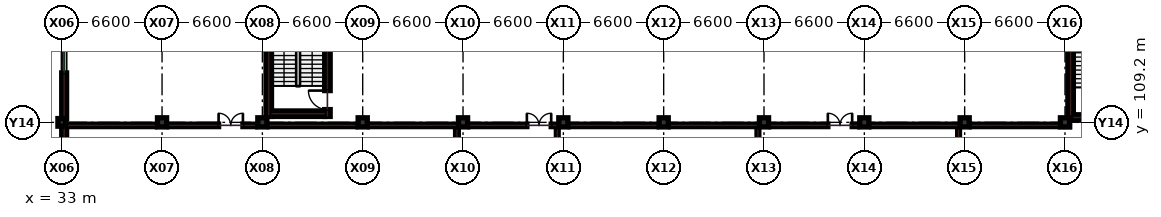
"""IFC4 building model, lengths in metres.
Left out: names, types, materials, properties, quantities, classifications, styles, units other than length and angle.
Written with IfcOpenShell. Run it as: python <this file> out.ifc"""

import sys

from ifc_helpers import new_model, si_unit, direction, frame, frame_2d, origin, origin_2d, place, context, subcontext, project, spatial, rectangle, extrude, element, fill, save


model = new_model("IFC4")
c1 = context("Model", 3, precision=1e-05, world=origin(), true_north=direction((0.0, 1.0)))
c2 = subcontext(c1, "Body", "Model", "MODEL_VIEW")
j1 = project(units=[si_unit("LENGTHUNIT", "METRE"), si_unit("PLANEANGLEUNIT", "RADIAN")], contexts=[c1])
p1 = place(None, origin())
s1 = spatial("IfcSite", under=j1, at=p1, CompositionType="ELEMENT")
p2 = place(p1, origin())
s2 = spatial("IfcBuilding", under=s1, at=p2, CompositionType="ELEMENT")
p3 = place(p2, frame((0.0, 0.0, 9.9)))
s3 = spatial("IfcBuildingStorey", under=s2, at=p3, CompositionType="ELEMENT", Elevation=9.9)
p4 = place(p3, frame((33.0, 109.2, 0.0), z_axis=(0.0, 0.0, 1.0), x_axis=(1.0, 0.0, 0.0)))
e1 = element("IfcColumn", 1, at=p4, inside=s3, PredefinedType="COLUMN", context=c2, shape_type="SweptSolid", body=[
    extrude(rectangle(XDim=0.5, YDim=0.5, at=origin_2d()), origin(), (0.0, 0.0, 1.0), 4.5),
])
for number, where, z_axis, x_axis in (
    (2, (39.6, 109.2, 0.0), (0.0, 0.0, 1.0), (1.0, 0.0, 0.0)),
    (3, (46.2, 109.2, 0.0), (0.0, 0.0, 1.0), (1.0, 0.0, 0.0)),
    (4, (52.8, 109.2, 0.0), (0.0, 0.0, 1.0), (1.0, 0.0, 0.0)),
    (5, (59.4, 109.2, 0.0), (0.0, 0.0, 1.0), (1.0, 0.0, 0.0)),
    (6, (66.0, 109.2, 0.0), (0.0, 0.0, 1.0), (1.0, 0.0, 0.0)),
    (7, (72.6, 109.2, 0.0), (0.0, 0.0, 1.0), (1.0, 0.0, 0.0)),
    (8, (79.2, 109.2, 0.0), (0.0, 0.0, 1.0), (1.0, 0.0, 0.0)),
    (9, (85.8, 109.2, 0.0), (0.0, 0.0, 1.0), (1.0, 0.0, 0.0)),
    (10, (92.4, 109.2, 0.0), (0.0, 0.0, 1.0), (1.0, 0.0, 0.0)),
    (11, (99.0, 109.2, 0.0), (0.0, 0.0, 1.0), (1.0, 0.0, 0.0)),
):
    element("IfcColumn", number, at=place(p3, frame(where, z_axis=z_axis, x_axis=x_axis)), inside=s3, PredefinedType="COLUMN", context=c2, shape_type="SweptSolid", body=[
        extrude(rectangle(XDim=0.6, YDim=0.6, at=origin_2d()), origin(), (0.0, 0.0, 1.0), 4.5),
    ])
p5 = place(p3, frame((33.32, 109.0, 0.0), z_axis=(0.0, 0.0, 1.0), x_axis=(1.0, 0.0, 0.0)))
e12 = element("IfcWall", 12, at=p5, inside=s3, PredefinedType="PARTITIONING", context=c2, shape_type="SweptSolid", body=[
    extrude(rectangle(XDim=5.83, YDim=0.16, at=frame_2d((2.915, 0.0))), origin(), (0.0, 0.0, 1.0), 3.475),
])
p6 = place(p3, frame((40.05, 109.0, 0.0), z_axis=(0.0, 0.0, 1.0), x_axis=(1.0, 0.0, 0.0)))
e13 = element("IfcWall", 13, at=p6, inside=s3, PredefinedType="PARTITIONING", context=c2, shape_type="SweptSolid", body=[
    extrude(rectangle(XDim=5.7, YDim=0.16, at=frame_2d((2.85, 0.0))), origin(), (0.0, 0.0, 1.0), 3.475),
])
p7 = place(p6, frame((3.27, 0.0, 0.0)))
e14 = element("IfcOpeningElement", 14, at=p7, cuts=e13, PredefinedType="OPENING", context=c2, shape_type="SweptSolid", body=[
    extrude(rectangle(XDim=1.6, YDim=2.2, at=frame_2d((0.8, 1.1))), frame((0.0, 0.09, 0.0), z_axis=(0.0, -1.0, 0.0), x_axis=(1.0, 0.0, 0.0)), (0.0, 0.0, 1.0), 0.18),
])
p8 = place(p3, frame((46.65, 109.0, 0.0), z_axis=(0.0, 0.0, 1.0), x_axis=(1.0, 0.0, 0.0)))
e15 = element("IfcWall", 15, at=p8, inside=s3, PredefinedType="PARTITIONING", context=c2, shape_type="SweptSolid", body=[
    extrude(rectangle(XDim=5.7, YDim=0.16, at=frame_2d((2.85, 0.0))), origin(), (0.0, 0.0, 1.0), 3.475),
])
p9 = place(p3, frame((53.25, 109.0, 0.0), z_axis=(0.0, 0.0, 1.0), x_axis=(1.0, 0.0, 0.0)))
e16 = element("IfcWall", 16, at=p9, inside=s3, PredefinedType="PARTITIONING", context=c2, shape_type="SweptSolid", body=[
    extrude(rectangle(XDim=5.7, YDim=0.16, at=frame_2d((2.85, 0.0))), origin(), (0.0, 0.0, 1.0), 3.475),
])
p10 = place(p3, frame((59.85, 109.0, 0.0), z_axis=(0.0, 0.0, 1.0), x_axis=(1.0, 0.0, 0.0)))
e17 = element("IfcWall", 17, at=p10, inside=s3, PredefinedType="PARTITIONING", context=c2, shape_type="SweptSolid", body=[
    extrude(rectangle(XDim=5.7, YDim=0.16, at=frame_2d((2.85, 0.0))), origin(), (0.0, 0.0, 1.0), 3.475),
])
p11 = place(p10, frame((3.75, 0.0, 0.0)))
e18 = element("IfcOpeningElement", 18, at=p11, cuts=e17, PredefinedType="OPENING", context=c2, shape_type="SweptSolid", body=[
    extrude(rectangle(XDim=1.6, YDim=2.2, at=frame_2d((0.8, 1.1))), frame((0.0, 0.09, 0.0), z_axis=(0.0, -1.0, 0.0), x_axis=(1.0, 0.0, 0.0)), (0.0, 0.0, 1.0), 0.18),
])
for number, where, z_axis, x_axis in (
    (19, (66.45, 109.0, 0.0), (0.0, 0.0, 1.0), (1.0, 0.0, 0.0)),
    (20, (73.05, 109.0, 0.0), (0.0, 0.0, 1.0), (1.0, 0.0, 0.0)),
):
    element("IfcWall", number, at=place(p3, frame(where, z_axis=z_axis, x_axis=x_axis)), inside=s3, PredefinedType="PARTITIONING", context=c2, shape_type="SweptSolid", body=[
        extrude(rectangle(XDim=5.7, YDim=0.16, at=frame_2d((2.85, 0.0))), origin(), (0.0, 0.0, 1.0), 3.475),
    ])
p12 = place(p3, frame((79.65, 109.0, 0.0), z_axis=(0.0, 0.0, 1.0), x_axis=(1.0, 0.0, 0.0)))
e21 = element("IfcWall", 21, at=p12, inside=s3, PredefinedType="PARTITIONING", context=c2, shape_type="SweptSolid", body=[
    extrude(rectangle(XDim=5.7, YDim=0.16, at=frame_2d((2.85, 0.0))), origin(), (0.0, 0.0, 1.0), 3.475),
])
p13 = place(p12, frame((3.75, 0.0, 0.0)))
e22 = element("IfcOpeningElement", 22, at=p13, cuts=e21, PredefinedType="OPENING", context=c2, shape_type="SweptSolid", body=[
    extrude(rectangle(XDim=1.6, YDim=2.2, at=frame_2d((0.8, 1.1))), frame((0.0, 0.09, 0.0), z_axis=(0.0, -1.0, 0.0), x_axis=(1.0, 0.0, 0.0)), (0.0, 0.0, 1.0), 0.18),
])
p14 = place(p3, frame((86.25, 109.0, 0.0), z_axis=(0.0, 0.0, 1.0), x_axis=(1.0, 0.0, 0.0)))
e23 = element("IfcWall", 23, at=p14, inside=s3, PredefinedType="PARTITIONING", context=c2, shape_type="SweptSolid", body=[
    extrude(rectangle(XDim=5.7, YDim=0.16, at=frame_2d((2.85, 0.0))), origin(), (0.0, 0.0, 1.0), 3.475),
])
p15 = place(p3, frame((92.85, 109.0, 0.0), z_axis=(0.0, 0.0, 1.0), x_axis=(1.0, 0.0, 0.0)))
e24 = element("IfcWall", 24, at=p15, inside=s3, PredefinedType="PARTITIONING", context=c2, shape_type="SweptSolid", body=[
    extrude(rectangle(XDim=6.45, YDim=0.16, at=frame_2d((3.225, 0.0))), origin(), (0.0, 0.0, 1.0), 3.475),
])
p16 = place(p3, frame((59.0, 100.8, 0.0), z_axis=(0.0, 0.0, 1.0), x_axis=(0.0, 1.0, 0.0)))
e25 = element("IfcWall", 25, at=p16, inside=s3, PredefinedType="SOLIDWALL", context=c2, shape_type="SweptSolid", body=[
    extrude(rectangle(XDim=8.2, YDim=0.18, at=frame_2d((4.1, 0.0))), origin(), (0.0, 0.0, 1.0), 3.49),
])
p17 = place(p3, frame((65.6, 101.0, 0.0), z_axis=(0.0, 0.0, 1.0), x_axis=(0.0, 1.0, 0.0)))
e26 = element("IfcWall", 26, at=p17, inside=s3, PredefinedType="PARTITIONING", context=c2, shape_type="SweptSolid", body=[
    extrude(rectangle(XDim=8.0, YDim=0.12, at=frame_2d((4.0, 0.0))), origin(), (0.0, 0.0, 1.0), 3.49),
])
p18 = place(p17, frame((3.8, 0.0, 0.0)))
e27 = element("IfcOpeningElement", 27, at=p18, cuts=e26, PredefinedType="OPENING", context=c2, shape_type="SweptSolid", body=[
    extrude(rectangle(XDim=1.45, YDim=2.25, at=frame_2d((0.725, 1.125))), frame((0.0, 0.07, 0.0), z_axis=(0.0, -1.0, 0.0), x_axis=(1.0, 0.0, 0.0)), (0.0, 0.0, 1.0), 0.14),
])
p19 = place(p3, frame((78.8, 101.0, 0.0), z_axis=(0.0, 0.0, 1.0), x_axis=(0.0, 1.0, 0.0)))
e28 = element("IfcWall", 28, at=p19, inside=s3, PredefinedType="PARTITIONING", context=c2, shape_type="SweptSolid", body=[
    extrude(rectangle(XDim=8.0, YDim=0.12, at=frame_2d((4.0, 0.0))), origin(), (0.0, 0.0, 1.0), 3.49),
])
p20 = place(p19, frame((3.8, 0.0, 0.0)))
e29 = element("IfcOpeningElement", 29, at=p20, cuts=e28, PredefinedType="OPENING", context=c2, shape_type="SweptSolid", body=[
    extrude(rectangle(XDim=1.75, YDim=2.3, at=frame_2d((0.875, 1.15))), frame((0.0, 0.07, 0.0), z_axis=(0.0, -1.0, 0.0), x_axis=(1.0, 0.0, 0.0)), (0.0, 0.0, 1.0), 0.14),
])
p21 = place(p3, frame((92.0, 101.0, 0.0), z_axis=(0.0, 0.0, 1.0), x_axis=(0.0, 1.0, 0.0)))
e30 = element("IfcWall", 30, at=p21, inside=s3, PredefinedType="PARTITIONING", context=c2, shape_type="SweptSolid", body=[
    extrude(rectangle(XDim=8.0, YDim=0.12, at=frame_2d((4.0, 0.0))), origin(), (0.0, 0.0, 1.0), 3.49),
])
p22 = place(p21, frame((3.8, 0.0, 0.0)))
e31 = element("IfcOpeningElement", 31, at=p22, cuts=e30, PredefinedType="OPENING", context=c2, shape_type="SweptSolid", body=[
    extrude(rectangle(XDim=1.95, YDim=2.35, at=frame_2d((0.975, 1.175))), frame((0.0, 0.07, 0.0), z_axis=(0.0, -1.0, 0.0), x_axis=(1.0, 0.0, 0.0)), (0.0, 0.0, 1.0), 0.14),
])
p23 = place(p3, frame((33.16, 108.955, 0.0), z_axis=(0.0, 0.0, 1.0), x_axis=(0.0, -1.0, 0.0)))
e32 = element("IfcWall", 32, at=p23, inside=s3, PredefinedType="SOLIDWALL", context=c2, shape_type="SweptSolid", body=[
    extrude(rectangle(XDim=7.91, YDim=0.32, at=frame_2d((3.955, 0.0))), origin(), (0.0, 0.0, 1.0), 3.625),
])
p24 = place(p23, frame((3.155, 0.0, 0.95)))
e33 = element("IfcOpeningElement", 33, at=p24, cuts=e32, PredefinedType="OPENING", context=c2, shape_type="SweptSolid", body=[
    extrude(rectangle(XDim=1.6, YDim=1.85, at=frame_2d((0.8, 0.925))), frame((0.0, 0.17, 0.0), z_axis=(0.0, -1.0, 0.0), x_axis=(1.0, 0.0, 0.0)), (0.0, 0.0, 1.0), 0.34),
])
p25 = place(p3, frame((33.16, 117.355, 0.0), z_axis=(0.0, 0.0, 1.0), x_axis=(0.0, -1.0, 0.0)))
e34 = element("IfcWall", 34, at=p25, inside=s3, PredefinedType="SOLIDWALL", context=c2, shape_type="SweptSolid", body=[
    extrude(rectangle(XDim=7.91, YDim=0.32, at=frame_2d((3.955, 0.0))), origin(), (0.0, 0.0, 1.0), 3.625),
])
p26 = place(p25, frame((3.005, 0.0, 0.95)))
e35 = element("IfcOpeningElement", 35, at=p26, cuts=e34, PredefinedType="OPENING", context=c2, shape_type="SweptSolid", body=[
    extrude(rectangle(XDim=1.9, YDim=1.85, at=frame_2d((0.95, 0.925))), frame((0.0, 0.17, 0.0), z_axis=(0.0, -1.0, 0.0), x_axis=(1.0, 0.0, 0.0)), (0.0, 0.0, 1.0), 0.34),
])
p27 = place(p3, frame((99.37, 109.34, 0.0), z_axis=(0.0, 0.0, 1.0), x_axis=(0.0, 1.0, 0.0)))
e36 = element("IfcWall", 36, at=p27, inside=s3, PredefinedType="SHEAR", context=c2, shape_type="SweptSolid", body=[
    extrude(rectangle(XDim=8.09, YDim=0.36, at=frame_2d((4.045, 0.0))), origin(), (0.0, 0.0, 1.0), 4.24),
])
p28 = place(p3, frame((99.55, 109.52, 0.0), z_axis=(0.0, 0.0, 1.0), x_axis=(1.0, 0.0, 0.0)))
e37 = element("IfcWall", 37, at=p28, inside=s3, PredefinedType="SHEAR", context=c2, shape_type="SweptSolid", body=[
    extrude(rectangle(XDim=3.8, YDim=0.36, at=frame_2d((1.9, 0.0))), origin(), (0.0, 0.0, 1.0), 4.24),
])
p29 = place(p3, frame((46.62, 109.59, 0.0), z_axis=(0.0, 0.0, 1.0), x_axis=(0.0, 1.0, 0.0)))
e38 = element("IfcWall", 38, at=p29, inside=s3, PredefinedType="SHEAR", context=c2, shape_type="SweptSolid", body=[
    extrude(rectangle(XDim=7.84, YDim=0.36, at=frame_2d((3.92, 0.0))), origin(), (0.0, 0.0, 1.0), 4.24),
])
p30 = place(p3, frame((50.48, 109.59, 0.0), z_axis=(0.0, 0.0, 1.0), x_axis=(0.0, 1.0, 0.0)))
e39 = element("IfcWall", 39, at=p30, inside=s3, PredefinedType="SHEAR", context=c2, shape_type="SweptSolid", body=[
    extrude(rectangle(XDim=7.84, YDim=0.36, at=frame_2d((3.92, 0.0))), origin(), (0.0, 0.0, 1.0), 4.24),
])
p31 = place(p30, frame((0.45, 0.0, 0.0)))
e40 = element("IfcOpeningElement", 40, at=p31, cuts=e39, PredefinedType="OPENING", context=c2, shape_type="SweptSolid", body=[
    extrude(rectangle(XDim=1.25, YDim=2.15, at=frame_2d((0.625, 1.075))), frame((0.0, 0.19, 0.0), z_axis=(0.0, -1.0, 0.0), x_axis=(1.0, 0.0, 0.0)), (0.0, 0.0, 1.0), 0.38),
])
p32 = place(p3, frame((46.8, 109.77, 0.0), z_axis=(0.0, 0.0, 1.0), x_axis=(1.0, 0.0, 0.0)))
e41 = element("IfcWall", 41, at=p32, inside=s3, PredefinedType="SHEAR", context=c2, shape_type="SweptSolid", body=[
    extrude(rectangle(XDim=3.5, YDim=0.36, at=frame_2d((1.75, 0.0))), origin(), (0.0, 0.0, 1.0), 4.24),
])
p33 = place(p7, origin())
e42 = element("IfcDoor", 42, at=p33, inside=s3, OperationType="DOUBLE_DOOR_SINGLE_SWING", PredefinedType="DOOR", context=c2, shape_type="SweptSolid", body=[
    extrude(rectangle(XDim=1.6, YDim=2.2, at=frame_2d((0.8, 1.1))), frame((0.0, 0.025, 0.0), z_axis=(0.0, -1.0, 0.0), x_axis=(1.0, 0.0, 0.0)), (0.0, 0.0, 1.0), 0.05),
])
fill(e14, e42)
p34 = place(p11, origin())
e43 = element("IfcDoor", 43, at=p34, inside=s3, OperationType="DOUBLE_DOOR_SINGLE_SWING", PredefinedType="DOOR", context=c2, shape_type="SweptSolid", body=[
    extrude(rectangle(XDim=1.6, YDim=2.2, at=frame_2d((0.8, 1.1))), frame((0.0, 0.025, 0.0), z_axis=(0.0, -1.0, 0.0), x_axis=(1.0, 0.0, 0.0)), (0.0, 0.0, 1.0), 0.05),
])
fill(e18, e43)
p35 = place(p13, origin())
e44 = element("IfcDoor", 44, at=p35, inside=s3, OperationType="DOUBLE_DOOR_SINGLE_SWING", PredefinedType="DOOR", context=c2, shape_type="SweptSolid", body=[
    extrude(rectangle(XDim=1.6, YDim=2.2, at=frame_2d((0.8, 1.1))), frame((0.0, 0.025, 0.0), z_axis=(0.0, -1.0, 0.0), x_axis=(1.0, 0.0, 0.0)), (0.0, 0.0, 1.0), 0.05),
])
fill(e22, e44)
p36 = place(p26, origin())
e45 = element("IfcWindow", 45, at=p36, inside=s3, PartitioningType="SINGLE_PANEL", PredefinedType="WINDOW", context=c2, shape_type="SweptSolid", body=[
    extrude(rectangle(XDim=1.9, YDim=1.85, at=frame_2d((0.95, 0.925))), frame((0.0, 0.03, 0.0), z_axis=(0.0, -1.0, 0.0), x_axis=(1.0, 0.0, 0.0)), (0.0, 0.0, 1.0), 0.06),
])
fill(e35, e45)
p37 = place(p31, origin())
e46 = element("IfcDoor", 46, at=p37, inside=s3, OperationType="SINGLE_SWING_RIGHT", PredefinedType="DOOR", context=c2, shape_type="SweptSolid", body=[
    extrude(rectangle(XDim=1.25, YDim=2.15, at=frame_2d((0.625, 1.075))), frame((0.0, 0.025, 0.0), z_axis=(0.0, -1.0, 0.0), x_axis=(1.0, 0.0, 0.0)), (0.0, 0.0, 1.0), 0.05),
])
fill(e40, e46)
save(model, sys.argv[1])
